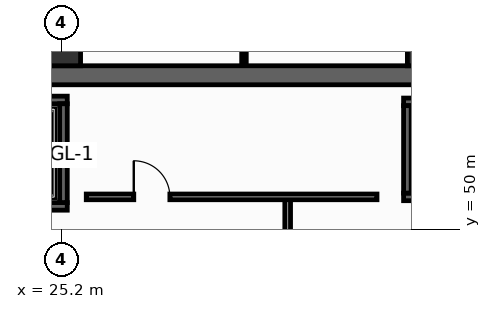
"""IFC4 building model, lengths in metres.
Left out: names, types, materials, properties, quantities, classifications, styles, units other than length and angle.
Written with IfcOpenShell. Run it as: python <this file> out.ifc"""

import sys

from ifc_helpers import new_model, si_unit, direction, frame, frame_2d, origin, origin_2d, place, context, subcontext, project, spatial, rectangle, hollow_rectangle, extrude, element, fill, save


model = new_model("IFC4")
c1 = context("Model", 3, precision=1e-05, world=origin(), true_north=direction((0.0, 1.0)))
c2 = subcontext(c1, "Body", "Model", "MODEL_VIEW")
j1 = project(units=[si_unit("LENGTHUNIT", "METRE"), si_unit("PLANEANGLEUNIT", "RADIAN")], contexts=[c1])
p1 = place(None, origin())
s1 = spatial("IfcSite", under=j1, at=p1, CompositionType="ELEMENT")
p2 = place(p1, origin())
s2 = spatial("IfcBuilding", under=s1, at=p2, CompositionType="ELEMENT")
p3 = place(p2, frame((0.0, 0.0, 171.4)))
s3 = spatial("IfcBuildingStorey", under=s2, at=p3, CompositionType="ELEMENT", Elevation=171.4)
p4 = place(p3, frame((13.6, 54.05, 0.0), z_axis=(0.0, 0.0, 1.0), x_axis=(1.0, 0.0, 0.0)))
e1 = element("IfcWall", 1, at=p4, inside=s3, PredefinedType="SHEAR", context=c2, shape_type="SweptSolid", body=[
    extrude(rectangle(XDim=32.7, YDim=0.5, at=frame_2d((16.35, 0.0))), origin(), (0.0, 0.0, 1.0), 3.55),
])
for number, where, z_axis, x_axis in (
    (2, (25.2, 54.8, 0.0), (0.0, 0.0, 1.0), (1.0, 0.0, 0.0)),
    (3, (34.8, 54.8, 0.0), (0.0, 0.0, 1.0), (1.0, 0.0, 0.0)),
):
    element("IfcColumn", number, at=place(p3, frame(where, z_axis=z_axis, x_axis=x_axis)), inside=s3, PredefinedType="COLUMN", context=c2, shape_type="SweptSolid", body=[
        extrude(hollow_rectangle(XDim=1.0, YDim=1.0, WallThickness=0.045, at=origin_2d()), origin(), (0.0, 0.0, 1.0), 3.8),
    ])
p5 = place(p3, frame((22.5, 50.6, 0.0), z_axis=(0.0, 0.0, 1.0), x_axis=(1.0, 0.0, 0.0)))
e4 = element("IfcWall", 4, at=p5, inside=s3, PredefinedType="SHEAR", context=c2, shape_type="SweptSolid", body=[
    extrude(rectangle(XDim=2.85, YDim=0.2, at=frame_2d((1.425, 0.0))), origin(), (0.0, 0.0, 1.0), 3.55),
])
p6 = place(p5, frame((0.925, 0.0, 0.0)))
e5 = element("IfcOpeningElement", 5, at=p6, cuts=e4, PredefinedType="OPENING", context=c2, shape_type="SweptSolid", body=[
    extrude(rectangle(XDim=1.25, YDim=2.3, at=frame_2d((0.625, 1.15))), frame((0.0, 0.11, 0.0), z_axis=(0.0, -1.0, 0.0), x_axis=(1.0, 0.0, 0.0)), (0.0, 0.0, 1.0), 0.22),
])
p7 = place(p3, frame((22.5, 53.4, 0.0), z_axis=(0.0, 0.0, 1.0), x_axis=(1.0, 0.0, 0.0)))
e6 = element("IfcWall", 6, at=p7, inside=s3, PredefinedType="SHEAR", context=c2, shape_type="SweptSolid", body=[
    extrude(rectangle(XDim=2.85, YDim=0.2, at=frame_2d((1.425, 0.0))), origin(), (0.0, 0.0, 1.0), 3.55),
])
p8 = place(p3, frame((25.25, 50.7, 0.0), z_axis=(0.0, 0.0, 1.0), x_axis=(0.0, 1.0, 0.0)))
e7 = element("IfcWall", 7, at=p8, inside=s3, PredefinedType="SHEAR", context=c2, shape_type="SweptSolid", body=[
    extrude(rectangle(XDim=2.6, YDim=0.2, at=frame_2d((1.3, 0.0))), origin(), (0.0, 0.0, 1.0), 3.55),
])
for number, where, z_axis, x_axis in (
    (8, (34.2, 50.85, 0.0), (0.0, 0.0, 1.0), (1.0, 0.0, 0.0)),
    (9, (34.2, 53.35, 0.0), (0.0, 0.0, 1.0), (1.0, 0.0, 0.0)),
):
    element("IfcWall", number, at=place(p3, frame(where, z_axis=z_axis, x_axis=x_axis)), inside=s3, PredefinedType="SHEAR", context=c2, shape_type="SweptSolid", body=[
        extrude(rectangle(XDim=2.575, YDim=0.2, at=frame_2d((1.288, 0.0))), origin(), (0.0, 0.0, 1.0), 3.55),
    ])
p9 = place(p3, frame((34.3, 50.95, 0.0), z_axis=(0.0, 0.0, 1.0), x_axis=(0.0, 1.0, 0.0)))
e10 = element("IfcWall", 10, at=p9, inside=s3, PredefinedType="SHEAR", context=c2, shape_type="SweptSolid", body=[
    extrude(rectangle(XDim=2.3, YDim=0.2, at=frame_2d((1.15, 0.0))), origin(), (0.0, 0.0, 1.0), 3.55),
])
p10 = place(p3, frame((31.15, 46.5, 0.0), z_axis=(0.0, 0.0, 1.0), x_axis=(0.0, 1.0, 0.0)))
e11 = element("IfcWall", 11, at=p10, inside=s3, PredefinedType="PARTITIONING", context=c2, shape_type="SweptSolid", body=[
    extrude(rectangle(XDim=4.35, YDim=0.15, at=frame_2d((2.175, 0.0))), origin(), (0.0, 0.0, 1.0), 3.55),
])
p11 = place(p10, frame((1.5, 0.0, 0.0)))
e12 = element("IfcOpeningElement", 12, at=p11, cuts=e11, PredefinedType="OPENING", context=c2, shape_type="SweptSolid", body=[
    extrude(rectangle(XDim=1.05, YDim=2.15, at=frame_2d((0.525, 1.075))), frame((0.0, 0.085, 0.0), z_axis=(0.0, -1.0, 0.0), x_axis=(1.0, 0.0, 0.0)), (0.0, 0.0, 1.0), 0.17),
])
p12 = place(p3, frame((25.85, 50.85, 0.0), z_axis=(0.0, 0.0, 1.0), x_axis=(1.0, 0.0, 0.0)))
e13 = element("IfcWall", 13, at=p12, inside=s3, PredefinedType="PARTITIONING", context=c2, shape_type="SweptSolid", body=[
    extrude(rectangle(XDim=7.65, YDim=0.15, at=frame_2d((3.825, 0.0))), origin(), (0.0, 0.0, 1.0), 3.55),
])
p13 = place(p12, frame((1.25, 0.0, 0.0)))
e14 = element("IfcOpeningElement", 14, at=p13, cuts=e13, PredefinedType="OPENING", context=c2, shape_type="SweptSolid", body=[
    extrude(rectangle(XDim=0.95, YDim=2.15, at=frame_2d((0.475, 1.075))), frame((0.0, 0.085, 0.0), z_axis=(0.0, -1.0, 0.0), x_axis=(1.0, 0.0, 0.0)), (0.0, 0.0, 1.0), 0.17),
])
p14 = place(p3, frame((30.0, 54.32, 0.0), z_axis=(0.0, 0.0, 1.0), x_axis=(0.0, 1.0, 0.0)))
e15 = element("IfcWall", 15, at=p14, inside=s3, PredefinedType="PARTITIONING", context=c2, shape_type="SweptSolid", body=[
    extrude(rectangle(XDim=1.675, YDim=0.12, at=frame_2d((0.837, 0.0))), origin(), (0.0, 0.0, 1.0), 2.935),
])
p15 = place(p13, origin())
e16 = element("IfcDoor", 16, at=p15, inside=s3, OperationType="SINGLE_SWING_LEFT", PredefinedType="DOOR", context=c2, shape_type="SweptSolid", body=[
    extrude(rectangle(XDim=0.95, YDim=2.15, at=frame_2d((0.475, 1.075))), frame((0.0, 0.025, 0.0), z_axis=(0.0, -1.0, 0.0), x_axis=(1.0, 0.0, 0.0)), (0.0, 0.0, 1.0), 0.05),
])
fill(e14, e16)
save(model, sys.argv[1])
